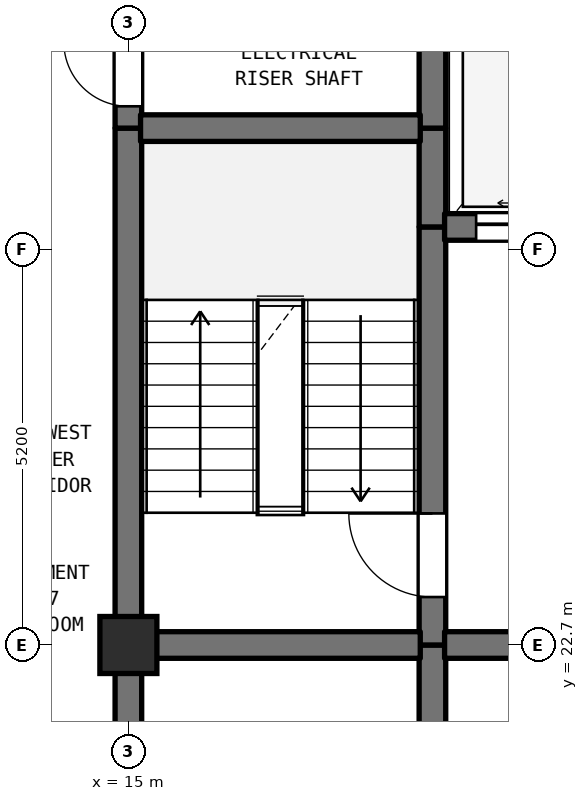
"""IFC4 building model, lengths in metres.
Left out: names, types, materials, properties, quantities, classifications, styles, units other than length and angle.
Written with IfcOpenShell. Run it as: python <this file> out.ifc"""

import sys

from ifc_helpers import new_model, si_unit, direction, frame, frame_2d, origin, origin_2d, place, context, subcontext, project, spatial, rectangle, extrude, element, fill, save


model = new_model("IFC4")
c1 = context("Model", 3, precision=1e-05, world=origin(), true_north=direction((0.0, 1.0)))
c2 = subcontext(c1, "Body", "Model", "MODEL_VIEW")
j1 = project(units=[si_unit("LENGTHUNIT", "METRE"), si_unit("PLANEANGLEUNIT", "RADIAN")], contexts=[c1])
p1 = place(None, origin())
s1 = spatial("IfcSite", under=j1, at=p1, CompositionType="ELEMENT")
p2 = place(p1, origin())
s2 = spatial("IfcBuilding", under=s1, at=p2, CompositionType="ELEMENT")
p3 = place(p2, frame((0.0, 0.0, 262.1)))
s3 = spatial("IfcBuildingStorey", under=s2, at=p3, CompositionType="ELEMENT", Elevation=262.1)
p4 = place(p3, frame((15.0, 22.7, 0.0), z_axis=(0.0, 0.0, 1.0), x_axis=(1.0, 0.0, 0.0)))
e1 = element("IfcColumn", 1, at=p4, inside=s3, PredefinedType="COLUMN", context=c2, shape_type="SweptSolid", body=[
    extrude(rectangle(XDim=0.75, YDim=0.75, at=origin_2d()), origin(), (0.0, 0.0, 1.0), 3.7),
])
p5 = place(p3, frame((15.0, 19.5, 0.0), z_axis=(0.0, 0.0, 1.0), x_axis=(0.0, 1.0, 0.0)))
e2 = element("IfcWall", 2, at=p5, inside=s3, PredefinedType="SHEAR", context=c2, shape_type="SweptSolid", body=[
    extrude(rectangle(XDim=3.2, YDim=0.35, at=frame_2d((1.6, 0.0))), origin(), (0.0, 0.0, 1.0), 3.39),
])
p6 = place(p3, frame((15.0, 22.7, 0.0), z_axis=(0.0, 0.0, 1.0), x_axis=(0.0, 1.0, 0.0)))
e3 = element("IfcWall", 3, at=p6, inside=s3, PredefinedType="SHEAR", context=c2, shape_type="SweptSolid", body=[
    extrude(rectangle(XDim=6.8, YDim=0.35, at=frame_2d((3.4, 0.0))), origin(), (0.0, 0.0, 1.0), 3.39),
])
p7 = place(p3, frame((15.0, 29.5, 0.0), z_axis=(0.0, 0.0, 1.0), x_axis=(0.0, 1.0, 0.0)))
e4 = element("IfcWall", 4, at=p7, inside=s3, PredefinedType="SHEAR", context=c2, shape_type="SweptSolid", body=[
    extrude(rectangle(XDim=1.6, YDim=0.35, at=frame_2d((0.8, 0.0))), origin(), (0.0, 0.0, 1.0), 3.39),
])
p8 = place(p7, frame((0.287, 0.0, 0.0)))
e5 = element("IfcOpeningElement", 5, at=p8, cuts=e4, PredefinedType="OPENING", context=c2, shape_type="SweptSolid", body=[
    extrude(rectangle(XDim=0.85, YDim=2.1, at=frame_2d((0.425, 1.05))), frame((0.0, 0.185, 0.0), z_axis=(0.0, -1.0, 0.0), x_axis=(1.0, 0.0, 0.0)), (0.0, 0.0, 1.0), 0.37),
])
p9 = place(p3, frame((19.0, 19.5, 0.0), z_axis=(0.0, 0.0, 1.0), x_axis=(0.0, 1.0, 0.0)))
e6 = element("IfcWall", 6, at=p9, inside=s3, PredefinedType="SHEAR", context=c2, shape_type="SweptSolid", body=[
    extrude(rectangle(XDim=3.2, YDim=0.35, at=frame_2d((1.6, 0.0))), origin(), (0.0, 0.0, 1.0), 3.39),
])
p10 = place(p3, frame((19.0, 22.7, 0.0), z_axis=(0.0, 0.0, 1.0), x_axis=(0.0, 1.0, 0.0)))
e7 = element("IfcWall", 7, at=p10, inside=s3, PredefinedType="SHEAR", context=c2, shape_type="SweptSolid", body=[
    extrude(rectangle(XDim=5.5, YDim=0.35, at=frame_2d((2.75, 0.0))), origin(), (0.0, 0.0, 1.0), 3.39),
])
p11 = place(p10, frame((0.631, 0.0, 0.0)))
e8 = element("IfcOpeningElement", 8, at=p11, cuts=e7, PredefinedType="OPENING", context=c2, shape_type="SweptSolid", body=[
    extrude(rectangle(XDim=1.1, YDim=2.15, at=frame_2d((0.55, 1.075))), frame((0.0, 0.185, 0.0), z_axis=(0.0, -1.0, 0.0), x_axis=(1.0, 0.0, 0.0)), (0.0, 0.0, 1.0), 0.37),
])
p12 = place(p3, frame((19.0, 28.2, 0.0), z_axis=(0.0, 0.0, 1.0), x_axis=(0.0, 1.0, 0.0)))
e9 = element("IfcWall", 9, at=p12, inside=s3, PredefinedType="SHEAR", context=c2, shape_type="SweptSolid", body=[
    extrude(rectangle(XDim=1.3, YDim=0.35, at=frame_2d((0.65, 0.0))), origin(), (0.0, 0.0, 1.0), 3.39),
])
p13 = place(p3, frame((19.0, 29.5, 0.0), z_axis=(0.0, 0.0, 1.0), x_axis=(0.0, 1.0, 0.0)))
e10 = element("IfcWall", 10, at=p13, inside=s3, PredefinedType="SHEAR", context=c2, shape_type="SweptSolid", body=[
    extrude(rectangle(XDim=5.5, YDim=0.35, at=frame_2d((2.75, 0.0))), origin(), (0.0, 0.0, 1.0), 3.39),
])
p14 = place(p13, frame((2.025, 0.0, 0.0)))
e11 = element("IfcOpeningElement", 11, at=p14, cuts=e10, PredefinedType="OPENING", context=c2, shape_type="SweptSolid", body=[
    extrude(rectangle(XDim=1.1, YDim=2.15, at=frame_2d((0.55, 1.075))), frame((0.0, 0.185, 0.0), z_axis=(0.0, -1.0, 0.0), x_axis=(1.0, 0.0, 0.0)), (0.0, 0.0, 1.0), 0.37),
])
p15 = place(p3, frame((15.16, 22.7, 0.0), z_axis=(0.0, 0.0, 1.0), x_axis=(1.0, 0.0, 0.0)))
e12 = element("IfcWall", 12, at=p15, inside=s3, PredefinedType="SHEAR", context=c2, shape_type="SweptSolid", body=[
    extrude(rectangle(XDim=3.68, YDim=0.35, at=frame_2d((1.84, 0.0))), origin(), (0.0, 0.0, 1.0), 3.39),
])
p16 = place(p3, frame((19.16, 22.7, 0.0), z_axis=(0.0, 0.0, 1.0), x_axis=(1.0, 0.0, 0.0)))
e13 = element("IfcWall", 13, at=p16, inside=s3, PredefinedType="SHEAR", context=c2, shape_type="SweptSolid", body=[
    extrude(rectangle(XDim=4.48, YDim=0.35, at=frame_2d((2.24, 0.0))), origin(), (0.0, 0.0, 1.0), 3.39),
])
p17 = place(p16, frame((1.64, 0.0, 0.0)))
e14 = element("IfcOpeningElement", 14, at=p17, cuts=e13, PredefinedType="OPENING", context=c2, shape_type="SweptSolid", body=[
    extrude(rectangle(XDim=1.2, YDim=2.2, at=frame_2d((0.6, 1.1))), frame((0.0, 0.185, 0.0), z_axis=(0.0, -1.0, 0.0), x_axis=(1.0, 0.0, 0.0)), (0.0, 0.0, 1.0), 0.37),
])
p18 = place(p3, frame((19.16, 28.2, 0.0), z_axis=(0.0, 0.0, 1.0), x_axis=(1.0, 0.0, 0.0)))
e15 = element("IfcWall", 15, at=p18, inside=s3, PredefinedType="SHEAR", context=c2, shape_type="SweptSolid", body=[
    extrude(rectangle(XDim=4.48, YDim=0.35, at=frame_2d((2.24, 0.0))), origin(), (0.0, 0.0, 1.0), 3.39),
])
p19 = place(p18, frame((0.415, 0.0, 0.0)))
e16 = element("IfcOpeningElement", 16, at=p19, cuts=e15, PredefinedType="OPENING", context=c2, shape_type="SweptSolid", body=[
    extrude(rectangle(XDim=1.25, YDim=2.2, at=frame_2d((0.625, 1.1))), frame((0.0, 0.185, 0.0), z_axis=(0.0, -1.0, 0.0), x_axis=(1.0, 0.0, 0.0)), (0.0, 0.0, 1.0), 0.37),
])
p20 = place(p18, frame((2.815, 0.0, 0.0)))
e17 = element("IfcOpeningElement", 17, at=p20, cuts=e15, PredefinedType="OPENING", context=c2, shape_type="SweptSolid", body=[
    extrude(rectangle(XDim=1.25, YDim=2.2, at=frame_2d((0.625, 1.1))), frame((0.0, 0.185, 0.0), z_axis=(0.0, -1.0, 0.0), x_axis=(1.0, 0.0, 0.0)), (0.0, 0.0, 1.0), 0.37),
])
p21 = place(p3, frame((15.16, 29.5, 0.0), z_axis=(0.0, 0.0, 1.0), x_axis=(1.0, 0.0, 0.0)))
e18 = element("IfcWall", 18, at=p21, inside=s3, PredefinedType="SHEAR", context=c2, shape_type="SweptSolid", body=[
    extrude(rectangle(XDim=3.68, YDim=0.35, at=frame_2d((1.84, 0.0))), origin(), (0.0, 0.0, 1.0), 3.39),
])
p22 = place(p8, origin())
e19 = element("IfcDoor", 19, at=p22, inside=s3, OperationType="SINGLE_SWING_RIGHT", PredefinedType="DOOR", context=c2, shape_type="SweptSolid", body=[
    extrude(rectangle(XDim=0.85, YDim=2.1, at=frame_2d((0.425, 1.05))), frame((0.0, 0.025, 0.0), z_axis=(0.0, -1.0, 0.0), x_axis=(1.0, 0.0, 0.0)), (0.0, 0.0, 1.0), 0.05),
])
fill(e5, e19)
p23 = place(p11, origin())
e20 = element("IfcDoor", 20, at=p23, inside=s3, OperationType="SINGLE_SWING_RIGHT", PredefinedType="DOOR", context=c2, shape_type="SweptSolid", body=[
    extrude(rectangle(XDim=1.1, YDim=2.15, at=frame_2d((0.55, 1.075))), frame((0.0, 0.025, 0.0), z_axis=(0.0, -1.0, 0.0), x_axis=(1.0, 0.0, 0.0)), (0.0, 0.0, 1.0), 0.05),
])
fill(e8, e20)
p24 = place(p19, origin())
e21 = element("IfcDoor", 21, at=p24, inside=s3, OperationType="DOUBLE_DOOR_SLIDING", PredefinedType="DOOR", context=c2, shape_type="SweptSolid", body=[
    extrude(rectangle(XDim=1.25, YDim=2.2, at=frame_2d((0.625, 1.1))), frame((0.0, 0.025, 0.0), z_axis=(0.0, -1.0, 0.0), x_axis=(1.0, 0.0, 0.0)), (0.0, 0.0, 1.0), 0.05),
])
fill(e16, e21)
save(model, sys.argv[1])
